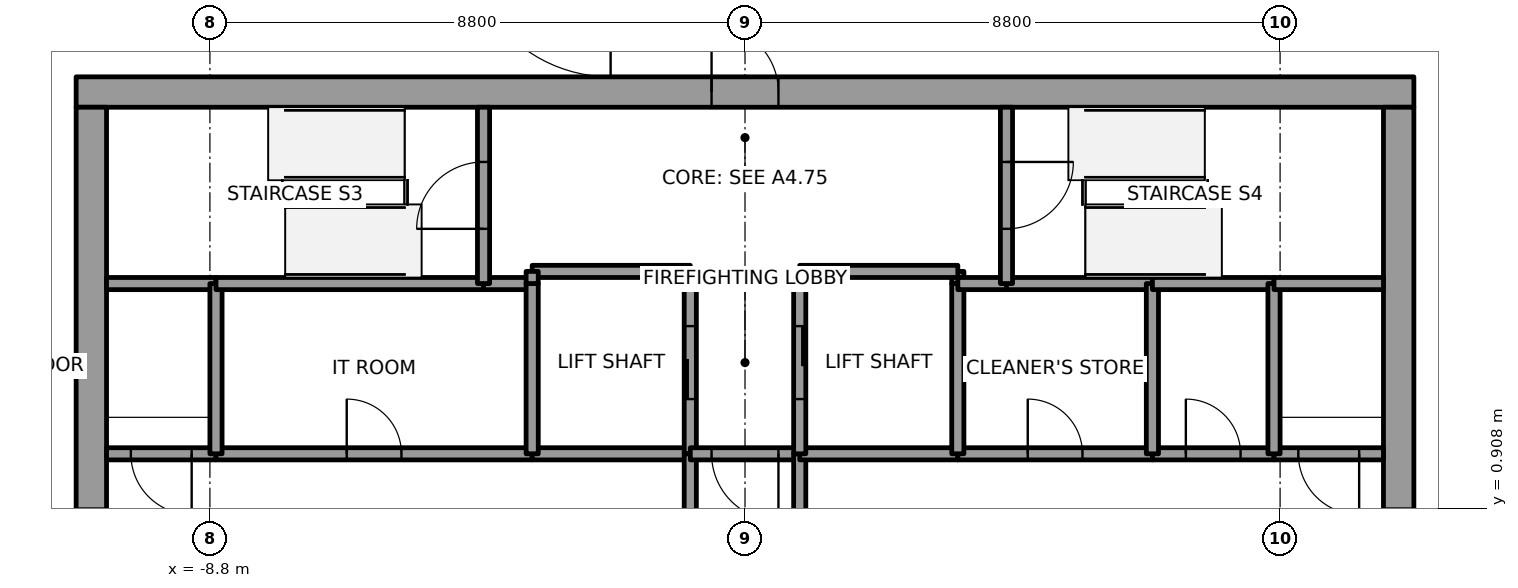
"""IFC4 building model, lengths in metres.
Left out: names, types, materials, properties, quantities, classifications, styles, units other than length and angle.
Written with IfcOpenShell. Run it as: python <this file> out.ifc"""

import sys

from ifc_helpers import new_model, si_unit, direction, frame, frame_2d, origin, place, context, subcontext, project, spatial, rectangle, extrude, element, fill, save


model = new_model("IFC4")
c1 = context("Model", 3, precision=1e-05, world=origin(), true_north=direction((0.0, 1.0)))
c2 = subcontext(c1, "Body", "Model", "MODEL_VIEW")
j1 = project(units=[si_unit("LENGTHUNIT", "METRE"), si_unit("PLANEANGLEUNIT", "RADIAN")], contexts=[c1])
p1 = place(None, origin())
s1 = spatial("IfcSite", under=j1, at=p1, CompositionType="ELEMENT")
p2 = place(p1, origin())
s2 = spatial("IfcBuilding", under=s1, at=p2, CompositionType="ELEMENT")
p3 = place(p2, frame((0.0, 0.0, 319.0)))
s3 = spatial("IfcBuildingStorey", under=s2, at=p3, CompositionType="ELEMENT", Elevation=319.0)
p4 = place(p3, frame((-11.0, 7.75, 0.0), z_axis=(0.0, 0.0, 1.0), x_axis=(1.0, 0.0, 0.0)))
e1 = element("IfcWall", 1, at=p4, inside=s3, PredefinedType="SHEAR", context=c2, shape_type="SweptSolid", body=[
    extrude(rectangle(XDim=22.0, YDim=0.5, at=frame_2d((11.0, 0.0))), origin(), (0.0, 0.0, 1.0), 5.4),
])
p5 = place(p4, frame((10.45, 0.0, 0.0)))
e2 = element("IfcOpeningElement", 2, at=p5, cuts=e1, PredefinedType="OPENING", context=c2, shape_type="SweptSolid", body=[
    extrude(rectangle(XDim=1.1, YDim=2.1, at=frame_2d((0.55, 1.05))), frame((0.0, 0.25, 0.0), z_axis=(0.0, -1.0, 0.0), x_axis=(1.0, 0.0, 0.0)), (0.0, 0.0, 1.0), 0.5),
])
p6 = place(p3, frame((-10.75, -7.5, 0.0), z_axis=(0.0, 0.0, 1.0), x_axis=(0.0, 1.0, 0.0)))
e3 = element("IfcWall", 3, at=p6, inside=s3, PredefinedType="SHEAR", context=c2, shape_type="SweptSolid", body=[
    extrude(rectangle(XDim=15.0, YDim=0.5, at=frame_2d((7.5, 0.0))), origin(), (0.0, 0.0, 1.0), 5.4),
])
p7 = place(p6, frame((6.6, 0.0, 0.0)))
e4 = element("IfcOpeningElement", 4, at=p7, cuts=e3, PredefinedType="OPENING", context=c2, shape_type="SweptSolid", body=[
    extrude(rectangle(XDim=1.8, YDim=2.1, at=frame_2d((0.9, 1.05))), frame((0.0, 0.25, 0.0), z_axis=(0.0, -1.0, 0.0), x_axis=(1.0, 0.0, 0.0)), (0.0, 0.0, 1.0), 0.5),
])
p8 = place(p3, frame((10.75, -7.5, 0.0), z_axis=(0.0, 0.0, 1.0), x_axis=(0.0, 1.0, 0.0)))
e5 = element("IfcWall", 5, at=p8, inside=s3, PredefinedType="SHEAR", context=c2, shape_type="SweptSolid", body=[
    extrude(rectangle(XDim=15.0, YDim=0.5, at=frame_2d((7.5, 0.0))), origin(), (0.0, 0.0, 1.0), 5.4),
])
p9 = place(p8, frame((6.6, 0.0, 0.0)))
e6 = element("IfcOpeningElement", 6, at=p9, cuts=e5, PredefinedType="OPENING", context=c2, shape_type="SweptSolid", body=[
    extrude(rectangle(XDim=1.8, YDim=2.1, at=frame_2d((0.9, 1.05))), frame((0.0, 0.25, 0.0), z_axis=(0.0, -1.0, 0.0), x_axis=(1.0, 0.0, 0.0)), (0.0, 0.0, 1.0), 0.5),
])
p10 = place(p3, frame((-8.7, 1.8, 0.0), z_axis=(0.0, 0.0, 1.0), x_axis=(-1.0, 0.0, 0.0)))
e7 = element("IfcWall", 7, at=p10, inside=s3, PredefinedType="SOLIDWALL", context=c2, shape_type="SweptSolid", body=[
    extrude(rectangle(XDim=1.8, YDim=0.2, at=frame_2d((0.9, 0.0))), origin(), (0.0, 0.0, 1.0), 5.25),
])
p11 = place(p10, frame((0.4, 0.0, 0.0)))
e8 = element("IfcOpeningElement", 8, at=p11, cuts=e7, PredefinedType="OPENING", context=c2, shape_type="SweptSolid", body=[
    extrude(rectangle(XDim=1.0, YDim=2.1, at=frame_2d((0.5, 1.05))), frame((0.0, 0.1, 0.0), z_axis=(0.0, -1.0, 0.0), x_axis=(1.0, 0.0, 0.0)), (0.0, 0.0, 1.0), 0.2),
])
p12 = place(p3, frame((-8.7, 4.6, 0.0), z_axis=(0.0, 0.0, 1.0), x_axis=(-1.0, 0.0, 0.0)))
e9 = element("IfcWall", 9, at=p12, inside=s3, PredefinedType="SOLIDWALL", context=c2, shape_type="SweptSolid", body=[
    extrude(rectangle(XDim=1.8, YDim=0.2, at=frame_2d((0.9, 0.0))), origin(), (0.0, 0.0, 1.0), 5.25),
])
p13 = place(p3, frame((-8.7, 1.8, 0.0), z_axis=(0.0, 0.0, 1.0), x_axis=(1.0, 0.0, 0.0)))
e10 = element("IfcWall", 10, at=p13, inside=s3, PredefinedType="SOLIDWALL", context=c2, shape_type="SweptSolid", body=[
    extrude(rectangle(XDim=5.2, YDim=0.2, at=frame_2d((2.6, 0.0))), origin(), (0.0, 0.0, 1.0), 5.25),
])
p14 = place(p13, frame((2.15, 0.0, 0.0)))
e11 = element("IfcOpeningElement", 11, at=p14, cuts=e10, PredefinedType="OPENING", context=c2, shape_type="SweptSolid", body=[
    extrude(rectangle(XDim=0.9, YDim=2.1, at=frame_2d((0.45, 1.05))), frame((0.0, 0.1, 0.0), z_axis=(0.0, -1.0, 0.0), x_axis=(1.0, 0.0, 0.0)), (0.0, 0.0, 1.0), 0.2),
])
p15 = place(p3, frame((-8.7, 4.6, 0.0), z_axis=(0.0, 0.0, 1.0), x_axis=(0.0, -1.0, 0.0)))
e12 = element("IfcWall", 12, at=p15, inside=s3, PredefinedType="SOLIDWALL", context=c2, shape_type="SweptSolid", body=[
    extrude(rectangle(XDim=2.8, YDim=0.2, at=frame_2d((1.4, 0.0))), origin(), (0.0, 0.0, 1.0), 5.25),
])
p16 = place(p3, frame((-4.3, 4.6, 0.0), z_axis=(0.0, 0.0, 1.0), x_axis=(-1.0, 0.0, 0.0)))
e13 = element("IfcWall", 13, at=p16, inside=s3, PredefinedType="SOLIDWALL", context=c2, shape_type="SweptSolid", body=[
    extrude(rectangle(XDim=4.4, YDim=0.2, at=frame_2d((2.2, 0.0))), origin(), (0.0, 0.0, 1.0), 5.25),
])
p17 = place(p3, frame((-3.5, 4.6, 0.0), z_axis=(0.0, 0.0, 1.0), x_axis=(-1.0, 0.0, 0.0)))
e14 = element("IfcWall", 14, at=p17, inside=s3, PredefinedType="SOLIDWALL", context=c2, shape_type="SweptSolid", body=[
    extrude(rectangle(XDim=0.8, YDim=0.2, at=frame_2d((0.4, 0.0))), origin(), (0.0, 0.0, 1.0), 5.25),
])
p18 = place(p3, frame((-4.3, 4.6, 0.0), z_axis=(0.0, 0.0, 1.0), x_axis=(0.0, 1.0, 0.0)))
e15 = element("IfcWall", 15, at=p18, inside=s3, PredefinedType="SOLIDWALL", context=c2, shape_type="SweptSolid", body=[
    extrude(rectangle(XDim=2.9, YDim=0.2, at=frame_2d((1.45, 0.0))), origin(), (0.0, 0.0, 1.0), 5.25),
])
p19 = place(p18, frame((0.9, 0.0, 0.0)))
e16 = element("IfcOpeningElement", 16, at=p19, cuts=e15, PredefinedType="OPENING", context=c2, shape_type="SweptSolid", body=[
    extrude(rectangle(XDim=1.1, YDim=2.1, at=frame_2d((0.55, 1.05))), frame((0.0, 0.1, 0.0), z_axis=(0.0, -1.0, 0.0), x_axis=(1.0, 0.0, 0.0)), (0.0, 0.0, 1.0), 0.2),
])
p20 = place(p3, frame((-0.9, 1.8, 0.0), z_axis=(0.0, 0.0, 1.0), x_axis=(-1.0, 0.0, 0.0)))
e17 = element("IfcWall", 17, at=p20, inside=s3, PredefinedType="SOLIDWALL", context=c2, shape_type="SweptSolid", body=[
    extrude(rectangle(XDim=2.6, YDim=0.2, at=frame_2d((1.3, 0.0))), origin(), (0.0, 0.0, 1.0), 5.25),
])
p21 = place(p3, frame((-3.5, 1.8, 0.0), z_axis=(0.0, 0.0, 1.0), x_axis=(0.0, 1.0, 0.0)))
e18 = element("IfcWall", 18, at=p21, inside=s3, PredefinedType="SOLIDWALL", context=c2, shape_type="SweptSolid", body=[
    extrude(rectangle(XDim=2.8, YDim=0.2, at=frame_2d((1.4, 0.0))), origin(), (0.0, 0.0, 1.0), 5.25),
])
p22 = place(p3, frame((-0.9, 1.8, 0.0), z_axis=(0.0, 0.0, 1.0), x_axis=(0.0, 1.0, 0.0)))
e19 = element("IfcWall", 19, at=p22, inside=s3, PredefinedType="SOLIDWALL", context=c2, shape_type="SweptSolid", body=[
    extrude(rectangle(XDim=3.0, YDim=0.2, at=frame_2d((1.5, 0.0))), origin(), (0.0, 0.0, 1.0), 5.25),
])
p23 = place(p22, frame((0.9, 0.0, 0.0)))
e20 = element("IfcOpeningElement", 20, at=p23, cuts=e19, PredefinedType="OPENING", context=c2, shape_type="SweptSolid", body=[
    extrude(rectangle(XDim=1.2, YDim=2.1, at=frame_2d((0.6, 1.05))), frame((0.0, 0.1, 0.0), z_axis=(0.0, -1.0, 0.0), x_axis=(1.0, 0.0, 0.0)), (0.0, 0.0, 1.0), 0.2),
])
p24 = place(p3, frame((-0.9, 4.8, 0.0), z_axis=(0.0, 0.0, 1.0), x_axis=(-1.0, 0.0, 0.0)))
e21 = element("IfcWall", 21, at=p24, inside=s3, PredefinedType="SOLIDWALL", context=c2, shape_type="SweptSolid", body=[
    extrude(rectangle(XDim=2.6, YDim=0.2, at=frame_2d((1.3, 0.0))), origin(), (0.0, 0.0, 1.0), 5.25),
])
p25 = place(p3, frame((-3.5, 4.8, 0.0), z_axis=(0.0, 0.0, 1.0), x_axis=(0.0, -1.0, 0.0)))
e22 = element("IfcWall", 22, at=p25, inside=s3, PredefinedType="SOLIDWALL", context=c2, shape_type="SweptSolid", body=[
    extrude(rectangle(XDim=0.2, YDim=0.2, at=frame_2d((0.1, 0.0))), origin(), (0.0, 0.0, 1.0), 5.25),
])
p26 = place(p3, frame((-0.9, 1.8, 0.0), z_axis=(0.0, 0.0, 1.0), x_axis=(0.0, -1.0, 0.0)))
e23 = element("IfcWall", 23, at=p26, inside=s3, PredefinedType="SOLIDWALL", context=c2, shape_type="SweptSolid", body=[
    extrude(rectangle(XDim=3.6, YDim=0.2, at=frame_2d((1.8, 0.0))), origin(), (0.0, 0.0, 1.0), 5.25),
])
p27 = place(p26, frame((1.05, 0.0, 0.0)))
e24 = element("IfcOpeningElement", 24, at=p27, cuts=e23, PredefinedType="OPENING", context=c2, shape_type="SweptSolid", body=[
    extrude(rectangle(XDim=1.5, YDim=2.1, at=frame_2d((0.75, 1.05))), frame((0.0, 0.1, 0.0), z_axis=(0.0, -1.0, 0.0), x_axis=(1.0, 0.0, 0.0)), (0.0, 0.0, 1.0), 0.2),
])
p28 = place(p3, frame((0.9, 1.8, 0.0), z_axis=(0.0, 0.0, 1.0), x_axis=(-1.0, 0.0, 0.0)))
e25 = element("IfcWall", 25, at=p28, inside=s3, PredefinedType="SOLIDWALL", context=c2, shape_type="SweptSolid", body=[
    extrude(rectangle(XDim=1.8, YDim=0.2, at=frame_2d((0.9, 0.0))), origin(), (0.0, 0.0, 1.0), 5.25),
])
p29 = place(p28, frame((0.35, 0.0, 0.0)))
e26 = element("IfcOpeningElement", 26, at=p29, cuts=e25, PredefinedType="OPENING", context=c2, shape_type="SweptSolid", body=[
    extrude(rectangle(XDim=1.1, YDim=2.1, at=frame_2d((0.55, 1.05))), frame((0.0, 0.1, 0.0), z_axis=(0.0, -1.0, 0.0), x_axis=(1.0, 0.0, 0.0)), (0.0, 0.0, 1.0), 0.2),
])
p30 = place(p3, frame((0.9, -1.8, 0.0), z_axis=(0.0, 0.0, 1.0), x_axis=(0.0, 1.0, 0.0)))
e27 = element("IfcWall", 27, at=p30, inside=s3, PredefinedType="SOLIDWALL", context=c2, shape_type="SweptSolid", body=[
    extrude(rectangle(XDim=3.6, YDim=0.2, at=frame_2d((1.8, 0.0))), origin(), (0.0, 0.0, 1.0), 5.25),
])
p31 = place(p30, frame((1.05, 0.0, 0.0)))
e28 = element("IfcOpeningElement", 28, at=p31, cuts=e27, PredefinedType="OPENING", context=c2, shape_type="SweptSolid", body=[
    extrude(rectangle(XDim=1.5, YDim=2.1, at=frame_2d((0.75, 1.05))), frame((0.0, 0.1, 0.0), z_axis=(0.0, -1.0, 0.0), x_axis=(1.0, 0.0, 0.0)), (0.0, 0.0, 1.0), 0.2),
])
p32 = place(p3, frame((3.5, 1.8, 0.0), z_axis=(0.0, 0.0, 1.0), x_axis=(-1.0, 0.0, 0.0)))
e29 = element("IfcWall", 29, at=p32, inside=s3, PredefinedType="SOLIDWALL", context=c2, shape_type="SweptSolid", body=[
    extrude(rectangle(XDim=2.6, YDim=0.2, at=frame_2d((1.3, 0.0))), origin(), (0.0, 0.0, 1.0), 5.25),
])
p33 = place(p3, frame((3.5, 4.6, 0.0), z_axis=(0.0, 0.0, 1.0), x_axis=(0.0, 1.0, 0.0)))
e30 = element("IfcWall", 30, at=p33, inside=s3, PredefinedType="SOLIDWALL", context=c2, shape_type="SweptSolid", body=[
    extrude(rectangle(XDim=0.2, YDim=0.2, at=frame_2d((0.1, 0.0))), origin(), (0.0, 0.0, 1.0), 5.25),
])
p34 = place(p3, frame((3.5, 4.8, 0.0), z_axis=(0.0, 0.0, 1.0), x_axis=(-1.0, 0.0, 0.0)))
e31 = element("IfcWall", 31, at=p34, inside=s3, PredefinedType="SOLIDWALL", context=c2, shape_type="SweptSolid", body=[
    extrude(rectangle(XDim=2.6, YDim=0.2, at=frame_2d((1.3, 0.0))), origin(), (0.0, 0.0, 1.0), 5.25),
])
p35 = place(p3, frame((0.9, 4.8, 0.0), z_axis=(0.0, 0.0, 1.0), x_axis=(0.0, -1.0, 0.0)))
e32 = element("IfcWall", 32, at=p35, inside=s3, PredefinedType="SOLIDWALL", context=c2, shape_type="SweptSolid", body=[
    extrude(rectangle(XDim=3.0, YDim=0.2, at=frame_2d((1.5, 0.0))), origin(), (0.0, 0.0, 1.0), 5.25),
])
p36 = place(p35, frame((0.9, 0.0, 0.0)))
e33 = element("IfcOpeningElement", 33, at=p36, cuts=e32, PredefinedType="OPENING", context=c2, shape_type="SweptSolid", body=[
    extrude(rectangle(XDim=1.2, YDim=2.1, at=frame_2d((0.6, 1.05))), frame((0.0, 0.1, 0.0), z_axis=(0.0, -1.0, 0.0), x_axis=(1.0, 0.0, 0.0)), (0.0, 0.0, 1.0), 0.2),
])
p37 = place(p3, frame((3.5, 1.8, 0.0), z_axis=(0.0, 0.0, 1.0), x_axis=(1.0, 0.0, 0.0)))
e34 = element("IfcWall", 34, at=p37, inside=s3, PredefinedType="SOLIDWALL", context=c2, shape_type="SweptSolid", body=[
    extrude(rectangle(XDim=3.2, YDim=0.2, at=frame_2d((1.6, 0.0))), origin(), (0.0, 0.0, 1.0), 5.25),
])
p38 = place(p37, frame((1.15, 0.0, 0.0)))
e35 = element("IfcOpeningElement", 35, at=p38, cuts=e34, PredefinedType="OPENING", context=c2, shape_type="SweptSolid", body=[
    extrude(rectangle(XDim=0.9, YDim=2.1, at=frame_2d((0.45, 1.05))), frame((0.0, 0.1, 0.0), z_axis=(0.0, -1.0, 0.0), x_axis=(1.0, 0.0, 0.0)), (0.0, 0.0, 1.0), 0.2),
])
p39 = place(p3, frame((3.5, 4.6, 0.0), z_axis=(0.0, 0.0, 1.0), x_axis=(0.0, -1.0, 0.0)))
e36 = element("IfcWall", 36, at=p39, inside=s3, PredefinedType="SOLIDWALL", context=c2, shape_type="SweptSolid", body=[
    extrude(rectangle(XDim=2.8, YDim=0.2, at=frame_2d((1.4, 0.0))), origin(), (0.0, 0.0, 1.0), 5.25),
])
p40 = place(p3, frame((4.3, 4.6, 0.0), z_axis=(0.0, 0.0, 1.0), x_axis=(-1.0, 0.0, 0.0)))
e37 = element("IfcWall", 37, at=p40, inside=s3, PredefinedType="SOLIDWALL", context=c2, shape_type="SweptSolid", body=[
    extrude(rectangle(XDim=0.8, YDim=0.2, at=frame_2d((0.4, 0.0))), origin(), (0.0, 0.0, 1.0), 5.25),
])
p41 = place(p3, frame((6.7, 4.6, 0.0), z_axis=(0.0, 0.0, 1.0), x_axis=(-1.0, 0.0, 0.0)))
e38 = element("IfcWall", 38, at=p41, inside=s3, PredefinedType="SOLIDWALL", context=c2, shape_type="SweptSolid", body=[
    extrude(rectangle(XDim=2.4, YDim=0.2, at=frame_2d((1.2, 0.0))), origin(), (0.0, 0.0, 1.0), 5.25),
])
p42 = place(p3, frame((4.3, 7.5, 0.0), z_axis=(0.0, 0.0, 1.0), x_axis=(0.0, -1.0, 0.0)))
e39 = element("IfcWall", 39, at=p42, inside=s3, PredefinedType="SOLIDWALL", context=c2, shape_type="SweptSolid", body=[
    extrude(rectangle(XDim=2.9, YDim=0.2, at=frame_2d((1.45, 0.0))), origin(), (0.0, 0.0, 1.0), 5.25),
])
p43 = place(p42, frame((0.9, 0.0, 0.0)))
e40 = element("IfcOpeningElement", 40, at=p43, cuts=e39, PredefinedType="OPENING", context=c2, shape_type="SweptSolid", body=[
    extrude(rectangle(XDim=1.1, YDim=2.1, at=frame_2d((0.55, 1.05))), frame((0.0, 0.1, 0.0), z_axis=(0.0, -1.0, 0.0), x_axis=(1.0, 0.0, 0.0)), (0.0, 0.0, 1.0), 0.2),
])
p44 = place(p3, frame((6.7, 1.8, 0.0), z_axis=(0.0, 0.0, 1.0), x_axis=(1.0, 0.0, 0.0)))
e41 = element("IfcWall", 41, at=p44, inside=s3, PredefinedType="SOLIDWALL", context=c2, shape_type="SweptSolid", body=[
    extrude(rectangle(XDim=2.0, YDim=0.2, at=frame_2d((1.0, 0.0))), origin(), (0.0, 0.0, 1.0), 5.25),
])
p45 = place(p44, frame((0.55, 0.0, 0.0)))
e42 = element("IfcOpeningElement", 42, at=p45, cuts=e41, PredefinedType="OPENING", context=c2, shape_type="SweptSolid", body=[
    extrude(rectangle(XDim=0.9, YDim=2.1, at=frame_2d((0.45, 1.05))), frame((0.0, 0.1, 0.0), z_axis=(0.0, -1.0, 0.0), x_axis=(1.0, 0.0, 0.0)), (0.0, 0.0, 1.0), 0.2),
])
p46 = place(p3, frame((6.7, 1.8, 0.0), z_axis=(0.0, 0.0, 1.0), x_axis=(0.0, 1.0, 0.0)))
e43 = element("IfcWall", 43, at=p46, inside=s3, PredefinedType="SOLIDWALL", context=c2, shape_type="SweptSolid", body=[
    extrude(rectangle(XDim=2.8, YDim=0.2, at=frame_2d((1.4, 0.0))), origin(), (0.0, 0.0, 1.0), 5.25),
])
p47 = place(p3, frame((8.7, 4.6, 0.0), z_axis=(0.0, 0.0, 1.0), x_axis=(-1.0, 0.0, 0.0)))
e44 = element("IfcWall", 44, at=p47, inside=s3, PredefinedType="SOLIDWALL", context=c2, shape_type="SweptSolid", body=[
    extrude(rectangle(XDim=2.0, YDim=0.2, at=frame_2d((1.0, 0.0))), origin(), (0.0, 0.0, 1.0), 5.25),
])
p48 = place(p3, frame((10.5, 1.8, 0.0), z_axis=(0.0, 0.0, 1.0), x_axis=(-1.0, 0.0, 0.0)))
e45 = element("IfcWall", 45, at=p48, inside=s3, PredefinedType="SOLIDWALL", context=c2, shape_type="SweptSolid", body=[
    extrude(rectangle(XDim=1.8, YDim=0.2, at=frame_2d((0.9, 0.0))), origin(), (0.0, 0.0, 1.0), 5.25),
])
p49 = place(p48, frame((0.4, 0.0, 0.0)))
e46 = element("IfcOpeningElement", 46, at=p49, cuts=e45, PredefinedType="OPENING", context=c2, shape_type="SweptSolid", body=[
    extrude(rectangle(XDim=1.0, YDim=2.1, at=frame_2d((0.5, 1.05))), frame((0.0, 0.1, 0.0), z_axis=(0.0, -1.0, 0.0), x_axis=(1.0, 0.0, 0.0)), (0.0, 0.0, 1.0), 0.2),
])
p50 = place(p3, frame((8.7, 1.8, 0.0), z_axis=(0.0, 0.0, 1.0), x_axis=(0.0, 1.0, 0.0)))
e47 = element("IfcWall", 47, at=p50, inside=s3, PredefinedType="SOLIDWALL", context=c2, shape_type="SweptSolid", body=[
    extrude(rectangle(XDim=2.8, YDim=0.2, at=frame_2d((1.4, 0.0))), origin(), (0.0, 0.0, 1.0), 5.25),
])
p51 = place(p3, frame((10.5, 4.6, 0.0), z_axis=(0.0, 0.0, 1.0), x_axis=(-1.0, 0.0, 0.0)))
e48 = element("IfcWall", 48, at=p51, inside=s3, PredefinedType="SOLIDWALL", context=c2, shape_type="SweptSolid", body=[
    extrude(rectangle(XDim=1.8, YDim=0.2, at=frame_2d((0.9, 0.0))), origin(), (0.0, 0.0, 1.0), 5.25),
])
p52 = place(p23, origin())
e49 = element("IfcDoor", 49, at=p52, inside=s3, OperationType="SLIDING_TO_RIGHT", PredefinedType="DOOR", context=c2, shape_type="SweptSolid", body=[
    extrude(rectangle(XDim=1.2, YDim=2.1, at=frame_2d((0.6, 1.05))), frame((0.0, 0.025, 0.0), z_axis=(0.0, -1.0, 0.0), x_axis=(1.0, 0.0, 0.0)), (0.0, 0.0, 1.0), 0.05),
])
fill(e20, e49)
p53 = place(p36, origin())
e50 = element("IfcDoor", 50, at=p53, inside=s3, OperationType="SLIDING_TO_RIGHT", PredefinedType="DOOR", context=c2, shape_type="SweptSolid", body=[
    extrude(rectangle(XDim=1.2, YDim=2.1, at=frame_2d((0.6, 1.05))), frame((0.0, 0.025, 0.0), z_axis=(0.0, -1.0, 0.0), x_axis=(1.0, 0.0, 0.0)), (0.0, 0.0, 1.0), 0.05),
])
fill(e33, e50)
p54 = place(p29, origin())
e51 = element("IfcDoor", 51, at=p54, inside=s3, OperationType="SINGLE_SWING_RIGHT", PredefinedType="DOOR", context=c2, shape_type="SweptSolid", body=[
    extrude(rectangle(XDim=1.1, YDim=2.1, at=frame_2d((0.55, 1.05))), frame((0.0, 0.025, 0.0), z_axis=(0.0, -1.0, 0.0), x_axis=(1.0, 0.0, 0.0)), (0.0, 0.0, 1.0), 0.05),
])
fill(e26, e51)
p55 = place(p11, origin())
e52 = element("IfcDoor", 52, at=p55, inside=s3, OperationType="SINGLE_SWING_RIGHT", PredefinedType="DOOR", context=c2, shape_type="SweptSolid", body=[
    extrude(rectangle(XDim=1.0, YDim=2.1, at=frame_2d((0.5, 1.05))), frame((0.0, 0.025, 0.0), z_axis=(0.0, -1.0, 0.0), x_axis=(1.0, 0.0, 0.0)), (0.0, 0.0, 1.0), 0.05),
])
fill(e8, e52)
p56 = place(p49, origin())
e53 = element("IfcDoor", 53, at=p56, inside=s3, OperationType="SINGLE_SWING_LEFT", PredefinedType="DOOR", context=c2, shape_type="SweptSolid", body=[
    extrude(rectangle(XDim=1.0, YDim=2.1, at=frame_2d((0.5, 1.05))), frame((0.0, 0.025, 0.0), z_axis=(0.0, -1.0, 0.0), x_axis=(1.0, 0.0, 0.0)), (0.0, 0.0, 1.0), 0.05),
])
fill(e46, e53)
p57 = place(p19, origin())
e54 = element("IfcDoor", 54, at=p57, inside=s3, OperationType="SINGLE_SWING_RIGHT", PredefinedType="DOOR", context=c2, shape_type="SweptSolid", body=[
    extrude(rectangle(XDim=1.1, YDim=2.1, at=frame_2d((0.55, 1.05))), frame((0.0, 0.025, 0.0), z_axis=(0.0, -1.0, 0.0), x_axis=(1.0, 0.0, 0.0)), (0.0, 0.0, 1.0), 0.05),
])
fill(e16, e54)
p58 = place(p43, origin())
e55 = element("IfcDoor", 55, at=p58, inside=s3, OperationType="SINGLE_SWING_LEFT", PredefinedType="DOOR", context=c2, shape_type="SweptSolid", body=[
    extrude(rectangle(XDim=1.1, YDim=2.1, at=frame_2d((0.55, 1.05))), frame((0.0, 0.025, 0.0), z_axis=(0.0, -1.0, 0.0), x_axis=(1.0, 0.0, 0.0)), (0.0, 0.0, 1.0), 0.05),
])
fill(e40, e55)
p59 = place(p38, origin())
e56 = element("IfcDoor", 56, at=p59, inside=s3, OperationType="SINGLE_SWING_LEFT", PredefinedType="DOOR", context=c2, shape_type="SweptSolid", body=[
    extrude(rectangle(XDim=0.9, YDim=2.1, at=frame_2d((0.45, 1.05))), frame((0.0, 0.025, 0.0), z_axis=(0.0, -1.0, 0.0), x_axis=(1.0, 0.0, 0.0)), (0.0, 0.0, 1.0), 0.05),
])
fill(e35, e56)
p60 = place(p45, origin())
e57 = element("IfcDoor", 57, at=p60, inside=s3, OperationType="SINGLE_SWING_LEFT", PredefinedType="DOOR", context=c2, shape_type="SweptSolid", body=[
    extrude(rectangle(XDim=0.9, YDim=2.1, at=frame_2d((0.45, 1.05))), frame((0.0, 0.025, 0.0), z_axis=(0.0, -1.0, 0.0), x_axis=(1.0, 0.0, 0.0)), (0.0, 0.0, 1.0), 0.05),
])
fill(e42, e57)
p61 = place(p14, origin())
e58 = element("IfcDoor", 58, at=p61, inside=s3, OperationType="SINGLE_SWING_RIGHT", PredefinedType="DOOR", context=c2, shape_type="SweptSolid", body=[
    extrude(rectangle(XDim=0.9, YDim=2.1, at=frame_2d((0.45, 1.05))), frame((0.0, 0.025, 0.0), z_axis=(0.0, -1.0, 0.0), x_axis=(1.0, 0.0, 0.0)), (0.0, 0.0, 1.0), 0.05),
])
fill(e11, e58)
p62 = place(p7, origin())
e59 = element("IfcDoor", 59, at=p62, inside=s3, OperationType="DOUBLE_DOOR_SINGLE_SWING", PredefinedType="DOOR", context=c2, shape_type="SweptSolid", body=[
    extrude(rectangle(XDim=1.8, YDim=2.1, at=frame_2d((0.9, 1.05))), frame((0.0, 0.025, 0.0), z_axis=(0.0, -1.0, 0.0), x_axis=(1.0, 0.0, 0.0)), (0.0, 0.0, 1.0), 0.05),
])
fill(e4, e59)
p63 = place(p9, origin())
e60 = element("IfcDoor", 60, at=p63, inside=s3, OperationType="DOUBLE_DOOR_SINGLE_SWING", PredefinedType="DOOR", context=c2, shape_type="SweptSolid", body=[
    extrude(rectangle(XDim=1.8, YDim=2.1, at=frame_2d((0.9, 1.05))), frame((0.0, 0.025, 0.0), z_axis=(0.0, -1.0, 0.0), x_axis=(1.0, 0.0, 0.0)), (0.0, 0.0, 1.0), 0.05),
])
fill(e6, e60)
p64 = place(p5, origin())
e61 = element("IfcDoor", 61, at=p64, inside=s3, OperationType="SINGLE_SWING_RIGHT", PredefinedType="DOOR", context=c2, shape_type="SweptSolid", body=[
    extrude(rectangle(XDim=1.1, YDim=2.1, at=frame_2d((0.55, 1.05))), frame((0.0, 0.025, 0.0), z_axis=(0.0, -1.0, 0.0), x_axis=(1.0, 0.0, 0.0)), (0.0, 0.0, 1.0), 0.05),
])
fill(e2, e61)
save(model, sys.argv[1])
